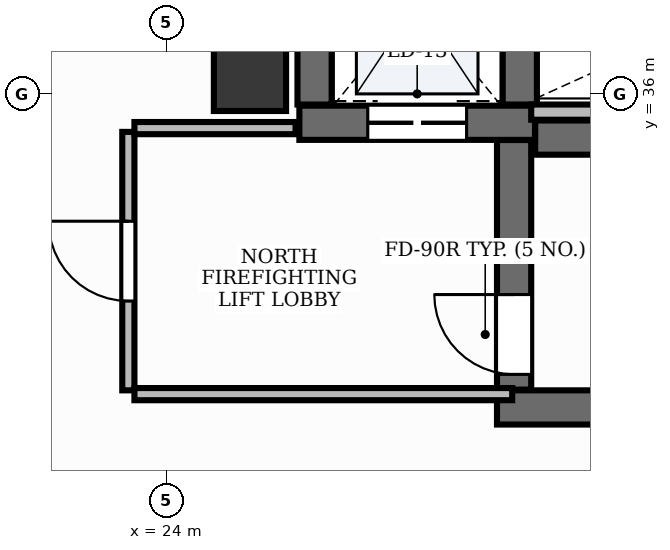
"""IFC4 building model, lengths in metres.
Left out: names, types, materials, properties, quantities, classifications, styles, units other than length and angle.
Written with IfcOpenShell. Run it as: python <this file> out.ifc"""

import sys

from ifc_helpers import new_model, si_unit, direction, frame, frame_2d, origin, origin_2d, place, context, subcontext, project, spatial, rectangle, extrude, element, fill, save


model = new_model("IFC4")
c1 = context("Model", 3, precision=1e-05, world=origin(), true_north=direction((0.0, 1.0)))
c2 = subcontext(c1, "Body", "Model", "MODEL_VIEW")
j1 = project(units=[si_unit("LENGTHUNIT", "METRE"), si_unit("PLANEANGLEUNIT", "RADIAN")], contexts=[c1])
p1 = place(None, origin())
s1 = spatial("IfcSite", under=j1, at=p1, CompositionType="ELEMENT")
p2 = place(p1, origin())
s2 = spatial("IfcBuilding", under=s1, at=p2, CompositionType="ELEMENT")
p3 = place(p2, frame((0.0, 0.0, 59.4)))
s3 = spatial("IfcBuildingStorey", under=s2, at=p3, CompositionType="ELEMENT", Elevation=59.4)
p4 = place(p3, frame((28.852, 35.425, 0.0), z_axis=(0.0, 0.0, 1.0), x_axis=(1.0, 0.0, 0.0)))
e1 = element("IfcWall", 1, at=p4, inside=s3, PredefinedType="SHEAR", context=c2, shape_type="SweptSolid", body=[
    extrude(rectangle(XDim=8.248, YDim=0.45, at=frame_2d((4.124, 0.0))), origin(), (0.0, 0.0, 1.0), 3.9),
])
p5 = place(p3, frame((28.35, 31.875, 0.0), z_axis=(0.0, 0.0, 1.0), x_axis=(1.0, 0.0, 0.0)))
e2 = element("IfcWall", 2, at=p5, inside=s3, PredefinedType="SHEAR", context=c2, shape_type="SweptSolid", body=[
    extrude(rectangle(XDim=8.75, YDim=0.45, at=frame_2d((4.375, 0.0))), origin(), (0.0, 0.0, 1.0), 3.9),
])
p6 = place(p3, frame((28.575, 32.11, 0.0), z_axis=(0.0, 0.0, 1.0), x_axis=(0.0, 1.0, 0.0)))
e3 = element("IfcWall", 3, at=p6, inside=s3, PredefinedType="SHEAR", context=c2, shape_type="SweptSolid", body=[
    extrude(rectangle(XDim=3.283, YDim=0.45, at=frame_2d((1.642, 0.0))), origin(), (0.0, 0.0, 1.0), 3.9),
])
p7 = place(p6, frame((0.2, 0.0, 0.0)))
e4 = element("IfcOpeningElement", 4, at=p7, cuts=e3, PredefinedType="OPENING", context=c2, shape_type="SweptSolid", body=[
    extrude(rectangle(XDim=1.05, YDim=2.15, at=frame_2d((0.525, 1.075))), frame((0.0, 0.24, 0.0), z_axis=(0.0, -1.0, 0.0), x_axis=(1.0, 0.0, 0.0)), (0.0, 0.0, 1.0), 0.48),
])
p8 = place(p3, frame((25.75, 35.62, 0.0), z_axis=(0.0, 0.0, 1.0), x_axis=(1.0, 0.0, 0.0)))
e5 = element("IfcWall", 5, at=p8, inside=s3, PredefinedType="SHEAR", context=c2, shape_type="SweptSolid", body=[
    extrude(rectangle(XDim=3.1, YDim=0.45, at=frame_2d((1.55, 0.0))), origin(), (0.0, 0.0, 1.0), 3.9),
])
p9 = place(p8, frame((0.9, 0.0, 0.0)))
e6 = element("IfcOpeningElement", 6, at=p9, cuts=e5, PredefinedType="OPENING", context=c2, shape_type="SweptSolid", body=[
    extrude(rectangle(XDim=1.3, YDim=2.2, at=frame_2d((0.65, 1.1))), frame((0.0, 0.24, 0.0), z_axis=(0.0, -1.0, 0.0), x_axis=(1.0, 0.0, 0.0)), (0.0, 0.0, 1.0), 0.48),
])
for number, where, z_axis, x_axis in (
    (7, (25.95, 35.86, 0.0), (0.0, 0.0, 1.0), (0.0, 1.0, 0.0)),
    (8, (28.65, 35.86, 0.0), (0.0, 0.0, 1.0), (0.0, 1.0, 0.0)),
):
    element("IfcWall", number, at=place(p3, frame(where, z_axis=z_axis, x_axis=x_axis)), inside=s3, PredefinedType="SHEAR", context=c2, shape_type="SweptSolid", body=[
        extrude(rectangle(XDim=2.7, YDim=0.45, at=frame_2d((1.35, 0.0))), origin(), (0.0, 0.0, 1.0), 3.9),
    ])
p10 = place(p3, frame((25.1, 36.25, -0.0), z_axis=(0.0, 0.0, 1.0), x_axis=(1.0, 0.0, 0.0)))
e9 = element("IfcColumn", 9, at=p10, inside=s3, PredefinedType="PILASTER", context=c2, shape_type="SweptSolid", body=[
    extrude(rectangle(XDim=0.95, YDim=0.95, at=origin_2d()), origin(), (0.0, 0.0, 1.0), 3.901),
])
p11 = place(p3, frame((28.8, 35.76, 0.0), z_axis=(0.0, 0.0, 1.0), x_axis=(1.0, 0.0, 0.0)))
e10 = element("IfcWall", 10, at=p11, inside=s3, PredefinedType="PARTITIONING", context=c2, shape_type="SweptSolid", body=[
    extrude(rectangle(XDim=4.57, YDim=0.2, at=frame_2d((2.285, 0.0))), origin(), (0.0, 0.0, 1.0), 2.91),
])
p12 = place(p3, frame((23.5, 32.1, 0.0), z_axis=(0.0, 0.0, 1.0), x_axis=(0.0, 1.0, 0.0)))
e11 = element("IfcWall", 11, at=p12, inside=s3, PredefinedType="PARTITIONING", context=c2, shape_type="SweptSolid", body=[
    extrude(rectangle(XDim=3.4, YDim=0.16, at=frame_2d((1.7, 0.0))), origin(), (0.0, 0.0, 1.0), 2.91),
])
p13 = place(p12, frame((1.175, 0.0, 0.0)))
e12 = element("IfcOpeningElement", 12, at=p13, cuts=e11, PredefinedType="OPENING", context=c2, shape_type="SweptSolid", body=[
    extrude(rectangle(XDim=1.05, YDim=2.15, at=frame_2d((0.525, 1.075))), frame((0.0, 0.095, 0.0), z_axis=(0.0, -1.0, 0.0), x_axis=(1.0, 0.0, 0.0)), (0.0, 0.0, 1.0), 0.19),
])
p14 = place(p3, frame((23.58, 32.05, 0.0), z_axis=(0.0, 0.0, 1.0), x_axis=(1.0, 0.0, 0.0)))
e13 = element("IfcWall", 13, at=p14, inside=s3, PredefinedType="PARTITIONING", context=c2, shape_type="SweptSolid", body=[
    extrude(rectangle(XDim=4.97, YDim=0.16, at=frame_2d((2.485, 0.0))), origin(), (0.0, 0.0, 1.0), 2.91),
])
p15 = place(p3, frame((23.58, 35.55, 0.0), z_axis=(0.0, 0.0, 1.0), x_axis=(1.0, 0.0, 0.0)))
e14 = element("IfcWall", 14, at=p15, inside=s3, PredefinedType="PARTITIONING", context=c2, shape_type="SweptSolid", body=[
    extrude(rectangle(XDim=2.12, YDim=0.16, at=frame_2d((1.06, 0.0))), origin(), (0.0, 0.0, 1.0), 2.91),
])
p16 = place(p7, origin())
e15 = element("IfcDoor", 15, at=p16, inside=s3, OperationType="SINGLE_SWING_RIGHT", PredefinedType="DOOR", context=c2, shape_type="SweptSolid", body=[
    extrude(rectangle(XDim=1.05, YDim=2.15, at=frame_2d((0.525, 1.075))), frame((0.0, 0.025, 0.0), z_axis=(0.0, -1.0, 0.0), x_axis=(1.0, 0.0, 0.0)), (0.0, 0.0, 1.0), 0.05),
])
fill(e4, e15)
p17 = place(p9, origin())
e16 = element("IfcDoor", 16, at=p17, inside=s3, OperationType="DOUBLE_DOOR_SLIDING", PredefinedType="DOOR", context=c2, shape_type="SweptSolid", body=[
    extrude(rectangle(XDim=1.3, YDim=2.2, at=frame_2d((0.65, 1.1))), frame((0.0, 0.025, 0.0), z_axis=(0.0, -1.0, 0.0), x_axis=(1.0, 0.0, 0.0)), (0.0, 0.0, 1.0), 0.05),
])
fill(e6, e16)
p18 = place(p13, origin())
e17 = element("IfcDoor", 17, at=p18, inside=s3, OperationType="SINGLE_SWING_RIGHT", PredefinedType="DOOR", context=c2, shape_type="SweptSolid", body=[
    extrude(rectangle(XDim=1.05, YDim=2.15, at=frame_2d((0.525, 1.075))), frame((0.0, 0.025, 0.0), z_axis=(0.0, -1.0, 0.0), x_axis=(1.0, 0.0, 0.0)), (0.0, 0.0, 1.0), 0.05),
])
fill(e12, e17)
save(model, sys.argv[1])
